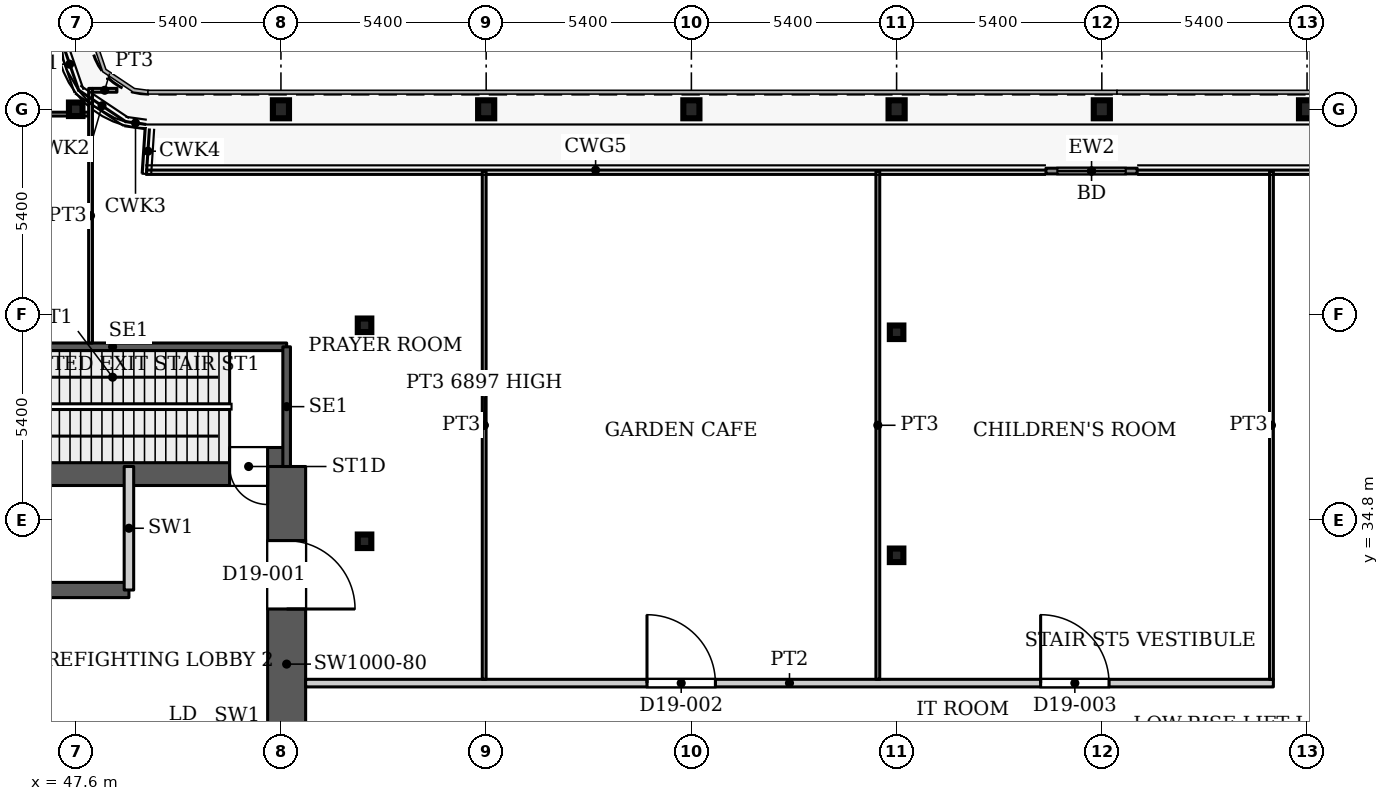
"""IFC4 building model, lengths in metres.
Left out: names, types, materials, properties, quantities, classifications, styles, units other than length and angle.
Written with IfcOpenShell. Run it as: python <this file> out.ifc"""

import sys

from ifc_helpers import new_model, si_unit, direction, frame, frame_2d, origin, origin_2d, place, context, subcontext, project, spatial, rectangle, hollow_rectangle, i_section, extrude, source, transform, mapped, element, fill, save


model = new_model("IFC4")
c1 = context("Model", 3, precision=1e-05, world=origin(), true_north=direction((0.0, 1.0)))
c2 = subcontext(c1, "Body", "Model", "MODEL_VIEW")
j1 = project(units=[si_unit("LENGTHUNIT", "METRE"), si_unit("PLANEANGLEUNIT", "RADIAN")], contexts=[c1])
p1 = place(None, origin())
s1 = spatial("IfcSite", under=j1, at=p1, CompositionType="ELEMENT")
p2 = place(p1, origin())
s2 = spatial("IfcBuilding", under=s1, at=p2, CompositionType="ELEMENT")
p3 = place(p2, frame((0.0, 0.0, 81.2)))
s3 = spatial("IfcBuildingStorey", under=s2, at=p3, CompositionType="ELEMENT", Elevation=81.2)
for number, where, z_axis, x_axis in (
    (1, (53.0, 45.6, 0.0), (0.0, 0.0, 1.0), (1.0, 0.0, 0.0)),
    (2, (58.4, 45.6, 0.0), (0.0, 0.0, 1.0), (1.0, 0.0, 0.0)),
    (3, (63.8, 45.6, 0.0), (0.0, 0.0, 1.0), (1.0, 0.0, 0.0)),
    (4, (69.2, 45.6, 0.0), (0.0, 0.0, 1.0), (1.0, 0.0, 0.0)),
    (5, (74.6, 45.6, 0.0), (0.0, 0.0, 1.0), (1.0, 0.0, 0.0)),
    (6, (80.0, 45.6, 0.0), (0.0, 0.0, 1.0), (1.0, 0.0, 0.0)),
):
    element("IfcColumn", number, at=place(p3, frame(where, z_axis=z_axis, x_axis=x_axis)), inside=s3, PredefinedType="COLUMN", context=c2, shape_type="SweptSolid", body=[
        extrude(i_section(OverallWidth=0.424, OverallDepth=0.474, WebThickness=0.048, FlangeThickness=0.077, FilletRadius=0.014, at=origin_2d()), origin(), (0.0, 0.0, 1.0), 7.8),
    ])
for number, where, z_axis, x_axis in (
    (7, (69.2, 33.863, 0.0), (0.0, 0.0, 1.0), (1.0, 0.0, 0.0)),
    (8, (55.2, 34.232, 0.0), (0.0, 0.0, 1.0), (1.0, 0.0, 0.0)),
    (9, (69.2, 39.732, 0.0), (0.0, 0.0, 1.0), (1.0, 0.0, 0.0)),
    (10, (55.2, 39.916, 0.0), (0.0, 0.0, 1.0), (1.0, 0.0, 0.0)),
    (11, (47.6, 45.6, 0.0), (0.0, 0.0, 1.0), (1.0, 0.0, 0.0)),
):
    element("IfcColumn", number, at=place(p3, frame(where, z_axis=z_axis, x_axis=x_axis)), inside=s3, PredefinedType="COLUMN", context=c2, shape_type="SweptSolid", body=[
        extrude(hollow_rectangle(XDim=0.356, YDim=0.356, WallThickness=0.016, InnerFilletRadius=0.016, OuterFilletRadius=0.032, at=origin_2d()), origin(), (0.0, 0.0, 1.0), 7.8),
    ])
p4 = place(p3, frame((34.75, 32.95, 0.0), z_axis=(0.0, 0.0, 1.0), x_axis=(1.0, 0.0, 0.0)))
e12 = element("IfcWall", 12, at=p4, inside=s3, PredefinedType="SHEAR", context=c2, shape_type="SweptSolid", body=[
    extrude(rectangle(XDim=14.25, YDim=0.4, at=frame_2d((7.125, 0.0))), origin(), (0.0, 0.0, 1.0), 7.8),
])
p5 = place(p3, frame((34.75, 36.2, 0.0), z_axis=(0.0, 0.0, 1.0), x_axis=(1.0, 0.0, 0.0)))
e13 = element("IfcWall", 13, at=p5, inside=s3, PredefinedType="SHEAR", context=c2, shape_type="SweptSolid", body=[
    extrude(rectangle(XDim=18.4, YDim=1.0, at=frame_2d((9.2, 0.0))), origin(), (0.0, 0.0, 1.0), 7.8),
])
p6 = place(p5, frame((16.9, 0.0, 0.0)))
e14 = element("IfcOpeningElement", 14, at=p6, cuts=e13, PredefinedType="OPENING", context=c2, shape_type="SweptSolid", body=[
    extrude(rectangle(XDim=1.0, YDim=2.2, at=frame_2d((0.5, 1.1))), frame((0.0, 0.51, 0.0), z_axis=(0.0, -1.0, 0.0), x_axis=(1.0, 0.0, 0.0)), (0.0, 0.0, 1.0), 1.02),
])
p7 = place(p3, frame((53.15, 25.8, 0.0), z_axis=(0.0, 0.0, 1.0), x_axis=(0.0, 1.0, 0.0)))
e15 = element("IfcWall", 15, at=p7, inside=s3, PredefinedType="SHEAR", context=c2, shape_type="SweptSolid", body=[
    extrude(rectangle(XDim=10.4, YDim=1.0, at=frame_2d((5.2, 0.0))), origin(), (0.0, 0.0, 1.0), 7.8),
])
p8 = place(p7, frame((1.175, 0.0, 0.0)))
e16 = element("IfcOpeningElement", 16, at=p8, cuts=e15, PredefinedType="OPENING", context=c2, shape_type="SweptSolid", body=[
    extrude(rectangle(XDim=0.9, YDim=2.2, at=frame_2d((0.45, 1.1))), frame((0.0, 0.51, 0.0), z_axis=(0.0, -1.0, 0.0), x_axis=(1.0, 0.0, 0.0)), (0.0, 0.0, 1.0), 1.02),
])
p9 = place(p7, frame((6.65, 0.0, 0.0)))
e17 = element("IfcOpeningElement", 17, at=p9, cuts=e15, PredefinedType="OPENING", context=c2, shape_type="SweptSolid", body=[
    extrude(rectangle(XDim=1.8, YDim=2.1, at=frame_2d((0.9, 1.05))), frame((0.0, 0.51, 0.0), z_axis=(0.0, -1.0, 0.0), x_axis=(1.0, 0.0, 0.0)), (0.0, 0.0, 1.0), 1.02),
])
p10 = place(p3, frame((73.13, 43.975, 0.0), z_axis=(0.0, 0.0, 1.0), x_axis=(1.0, 0.0, 0.0)))
e18 = element("IfcWall", 18, at=p10, inside=s3, PredefinedType="SOLIDWALL", context=c2, shape_type="SweptSolid", body=[
    extrude(rectangle(XDim=2.4, YDim=0.15, at=frame_2d((1.2, 0.0))), origin(), (0.0, 0.0, 1.0), 7.65),
])
p11 = place(p10, frame((0.3, 0.0, 0.0)))
e19 = element("IfcOpeningElement", 19, at=p11, cuts=e18, PredefinedType="OPENING", context=c2, shape_type="SweptSolid", body=[
    extrude(rectangle(XDim=1.8, YDim=2.4, at=frame_2d((0.9, 1.2))), frame((0.0, 0.085, 0.0), z_axis=(0.0, -1.0, 0.0), x_axis=(1.0, 0.0, 0.0)), (0.0, 0.0, 1.0), 0.17),
])
p12 = place(p3, frame((43.99, 39.35, 0.0), z_axis=(0.0, 0.0, 1.0), x_axis=(1.0, 0.0, 0.0)))
e20 = element("IfcWall", 20, at=p12, inside=s3, PredefinedType="SHEAR", context=c2, shape_type="SweptSolid", body=[
    extrude(rectangle(XDim=9.16, YDim=0.2, at=frame_2d((4.58, 0.0))), origin(), (0.0, 0.0, 1.0), 7.8),
])
p13 = place(p3, frame((53.15, 36.2, 0.0), z_axis=(0.0, 0.0, 1.0), x_axis=(0.0, 1.0, 0.0)))
e21 = element("IfcWall", 21, at=p13, inside=s3, PredefinedType="SHEAR", context=c2, shape_type="SweptSolid", body=[
    extrude(rectangle(XDim=3.15, YDim=0.2, at=frame_2d((1.575, 0.0))), origin(), (0.0, 0.0, 1.0), 7.8),
])
p14 = place(p3, frame((49.0, 32.95, 0.0), z_axis=(0.0, 0.0, 1.0), x_axis=(0.0, 1.0, 0.0)))
e22 = element("IfcWall", 22, at=p14, inside=s3, PredefinedType="PARTITIONING", context=c2, shape_type="SweptSolid", body=[
    extrude(rectangle(XDim=3.25, YDim=0.25, at=frame_2d((1.625, 0.0))), origin(), (0.0, 0.0, 1.0), 7.8),
])
p15 = place(p3, frame((37.999, 45.473, 0.0), z_axis=(0.0, 0.0, 1.0), x_axis=(1.0, 0.0, 0.0)))
e23 = element("IfcWall", 23, at=p15, inside=s3, PredefinedType="PARTITIONING", context=c2, shape_type="SweptSolid", body=[
    extrude(rectangle(XDim=9.941, YDim=0.1, at=frame_2d((4.97, 0.0))), origin(), (0.0, 0.0, 1.0), 7.5),
])
p16 = place(p15, frame((4.551, 0.0, 0.0)))
e24 = element("IfcOpeningElement", 24, at=p16, cuts=e23, PredefinedType="OPENING", context=c2, shape_type="SweptSolid", body=[
    extrude(rectangle(XDim=1.0, YDim=2.1, at=frame_2d((0.5, 1.05))), frame((0.0, 0.06, 0.0), z_axis=(0.0, -1.0, 0.0), x_axis=(1.0, 0.0, 0.0)), (0.0, 0.0, 1.0), 0.12),
])
p17 = place(p3, frame((47.99, 39.449, 0.0), z_axis=(0.0, 0.0, 1.0), x_axis=(0.0, 1.0, 0.0)))
e25 = element("IfcWall", 25, at=p17, inside=s3, PredefinedType="PARTITIONING", context=c2, shape_type="SweptSolid", body=[
    extrude(rectangle(XDim=6.701, YDim=0.1, at=frame_2d((3.351, 0.0))), origin(), (0.0, 0.0, 1.0), 7.5),
])
p18 = place(p3, frame((48.04, 46.1, 0.0), z_axis=(0.0, 0.0, 1.0), x_axis=(1.0, 0.0, 0.0)))
e26 = element("IfcWall", 26, at=p18, inside=s3, PredefinedType="PARTITIONING", context=c2, shape_type="SweptSolid", body=[
    extrude(rectangle(XDim=0.644, YDim=0.1, at=frame_2d((0.322, 0.0))), origin(), (0.0, 0.0, 1.0), 7.5),
])
p19 = place(p3, frame((53.649, 30.5, 0.0), z_axis=(0.0, 0.0, 1.0), x_axis=(1.0, 0.0, 0.0)))
e27 = element("IfcWall", 27, at=p19, inside=s3, PredefinedType="PARTITIONING", context=c2, shape_type="SweptSolid", body=[
    extrude(rectangle(XDim=25.465, YDim=0.2, at=frame_2d((12.732, 0.0))), origin(), (0.0, 0.0, 1.0), 7.5),
])
p20 = place(p19, frame((8.983, 0.0, 0.0)))
e28 = element("IfcOpeningElement", 28, at=p20, cuts=e27, PredefinedType="OPENING", context=c2, shape_type="SweptSolid", body=[
    extrude(rectangle(XDim=1.8, YDim=2.1, at=frame_2d((0.9, 1.05))), frame((0.0, 0.11, 0.0), z_axis=(0.0, -1.0, 0.0), x_axis=(1.0, 0.0, 0.0)), (0.0, 0.0, 1.0), 0.22),
])
p21 = place(p19, frame((19.341, 0.0, 0.0)))
e29 = element("IfcOpeningElement", 29, at=p21, cuts=e27, PredefinedType="OPENING", context=c2, shape_type="SweptSolid", body=[
    extrude(rectangle(XDim=1.8, YDim=2.1, at=frame_2d((0.9, 1.05))), frame((0.0, 0.11, 0.0), z_axis=(0.0, -1.0, 0.0), x_axis=(1.0, 0.0, 0.0)), (0.0, 0.0, 1.0), 0.22),
])
p22 = place(p3, frame((58.348, 30.6, 0.0), z_axis=(0.0, 0.0, 1.0), x_axis=(0.0, 1.0, 0.0)))
e30 = element("IfcWall", 30, at=p22, inside=s3, PredefinedType="PARTITIONING", context=c2, shape_type="SweptSolid", body=[
    extrude(rectangle(XDim=13.37, YDim=0.1, at=frame_2d((6.685, 0.0))), origin(), (0.0, 0.0, 1.0), 6.897),
])
for number, where, z_axis, x_axis in (
    (31, (68.706, 30.6, 0.0), (0.0, 0.0, 1.0), (0.0, 1.0, 0.0)),
    (32, (79.064, 30.6, 0.0), (0.0, 0.0, 1.0), (0.0, 1.0, 0.0)),
):
    element("IfcWall", number, at=place(p3, frame(where, z_axis=z_axis, x_axis=x_axis)), inside=s3, PredefinedType="PARTITIONING", context=c2, shape_type="SweptSolid", body=[
        extrude(rectangle(XDim=13.37, YDim=0.1, at=frame_2d((6.685, 0.0))), origin(), (0.0, 0.0, 1.0), 7.5),
    ])
m1 = source(origin(), c2, "Body", "SweptSolid", [
    extrude(rectangle(XDim=1.8, YDim=2.4, at=frame_2d((0.9, 1.2))), frame((0.0, 0.025, 0.0), z_axis=(0.0, -1.0, 0.0), x_axis=(1.0, 0.0, 0.0)), (0.0, 0.0, 1.0), 0.05),
])
p23 = place(p11, origin())
e33 = element("IfcDoor", 33, at=p23, inside=s3, OperationType="SLIDING_TO_LEFT", PredefinedType="DOOR", context=c2, shape_type="MappedRepresentation", body=[
    mapped(m1, transform((0.0, 0.0, 0.0), x_axis=(1.0, 0.0, 0.0), y_axis=(0.0, 1.0, 0.0), z_axis=(0.0, 0.0, 1.0), scale=1.0)),
])
fill(e19, e33)
m2 = source(origin(), c2, "Body", "SweptSolid", [
    extrude(rectangle(XDim=1.0, YDim=2.2, at=frame_2d((0.5, 1.1))), frame((0.0, 0.025, 0.0), z_axis=(0.0, -1.0, 0.0), x_axis=(1.0, 0.0, 0.0)), (0.0, 0.0, 1.0), 0.05),
])
p24 = place(p6, origin())
e34 = element("IfcDoor", 34, at=p24, inside=s3, OperationType="SINGLE_SWING_RIGHT", PredefinedType="DOOR", context=c2, shape_type="MappedRepresentation", body=[
    mapped(m2, transform((0.0, 0.0, 0.0), x_axis=(1.0, 0.0, 0.0), y_axis=(0.0, 1.0, 0.0), z_axis=(0.0, 0.0, 1.0), scale=1.0)),
])
fill(e14, e34)
m3 = source(origin(), c2, "Body", "SweptSolid", [
    extrude(rectangle(XDim=1.8, YDim=2.1, at=frame_2d((0.9, 1.05))), frame((0.0, 0.025, 0.0), z_axis=(0.0, -1.0, 0.0), x_axis=(1.0, 0.0, 0.0)), (0.0, 0.0, 1.0), 0.05),
])
p25 = place(p9, origin())
e35 = element("IfcDoor", 35, at=p25, inside=s3, OperationType="DOUBLE_DOOR_SINGLE_SWING", PredefinedType="DOOR", context=c2, shape_type="MappedRepresentation", body=[
    mapped(m3, transform((0.0, 0.0, 0.0), x_axis=(1.0, 0.0, 0.0), y_axis=(0.0, 1.0, 0.0), z_axis=(0.0, 0.0, 1.0), scale=1.0)),
])
fill(e17, e35)
m4 = source(origin(), c2, "Body", "SweptSolid", [
    extrude(rectangle(XDim=1.8, YDim=2.1, at=frame_2d((0.9, 1.05))), frame((0.0, 0.025, 0.0), z_axis=(0.0, -1.0, 0.0), x_axis=(1.0, 0.0, 0.0)), (0.0, 0.0, 1.0), 0.05),
])
p26 = place(p20, origin())
e36 = element("IfcDoor", 36, at=p26, inside=s3, OperationType="DOUBLE_DOOR_SINGLE_SWING", PredefinedType="DOOR", context=c2, shape_type="MappedRepresentation", body=[
    mapped(m4, transform((0.0, 0.0, 0.0), x_axis=(1.0, 0.0, 0.0), y_axis=(0.0, 1.0, 0.0), z_axis=(0.0, 0.0, 1.0), scale=1.0)),
])
fill(e28, e36)
p27 = place(p21, origin())
e37 = element("IfcDoor", 37, at=p27, inside=s3, OperationType="DOUBLE_DOOR_SINGLE_SWING", PredefinedType="DOOR", context=c2, shape_type="MappedRepresentation", body=[
    mapped(m4, transform((0.0, 0.0, 0.0), x_axis=(1.0, 0.0, 0.0), y_axis=(0.0, 1.0, 0.0), z_axis=(0.0, 0.0, 1.0), scale=1.0)),
])
fill(e29, e37)
save(model, sys.argv[1])
